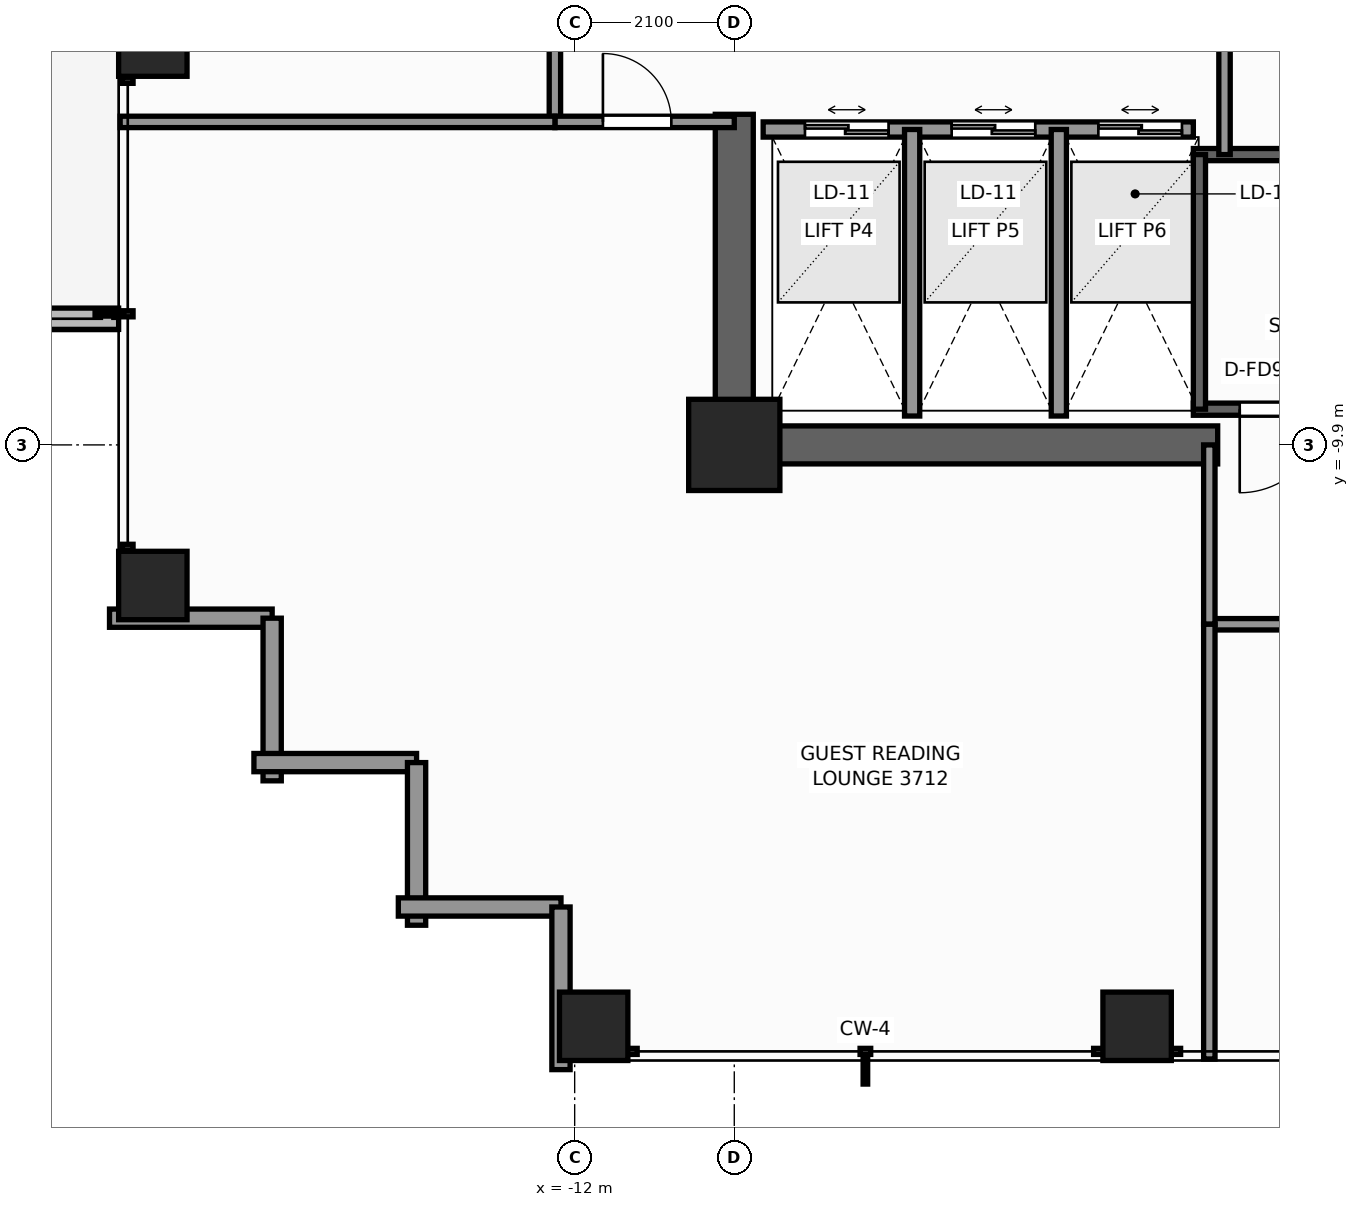
"""IFC4 building model, lengths in metres.
Left out: names, types, materials, properties, quantities, classifications, styles, units other than length and angle.
Written with IfcOpenShell. Run it as: python <this file> out.ifc"""

import sys

from ifc_helpers import new_model, si_unit, direction, frame, frame_2d, origin, origin_2d, place, context, subcontext, project, spatial, rectangle, extrude, element, fill, save


model = new_model("IFC4")
c1 = context("Model", 3, precision=1e-05, world=origin(), true_north=direction((0.0, 1.0)))
c2 = subcontext(c1, "Body", "Model", "MODEL_VIEW")
j1 = project(units=[si_unit("LENGTHUNIT", "METRE"), si_unit("PLANEANGLEUNIT", "RADIAN")], contexts=[c1])
p1 = place(None, origin())
s1 = spatial("IfcSite", under=j1, at=p1, CompositionType="ELEMENT")
p2 = place(p1, origin())
s2 = spatial("IfcBuilding", under=s1, at=p2, CompositionType="ELEMENT")
p3 = place(p2, frame((0.0, 0.0, 128.3)))
s3 = spatial("IfcBuildingStorey", under=s2, at=p3, CompositionType="ELEMENT", Elevation=128.3)
p4 = place(p3, frame((-3.54, -9.9, 0.0), z_axis=(0.0, 0.0, 1.0), x_axis=(-1.0, 0.0, 0.0)))
e1 = element("IfcWall", 1, at=p4, inside=s3, PredefinedType="SHEAR", context=c2, shape_type="SweptSolid", body=[
    extrude(rectangle(XDim=6.61, YDim=0.5, at=frame_2d((3.305, 0.0))), origin(), (0.0, 0.0, 1.0), 3.3),
])
p5 = place(p3, frame((-9.9, -9.65, 0.0), z_axis=(0.0, 0.0, 1.0), x_axis=(0.0, 1.0, 0.0)))
e2 = element("IfcWall", 2, at=p5, inside=s3, PredefinedType="SHEAR", context=c2, shape_type="SweptSolid", body=[
    extrude(rectangle(XDim=4.1, YDim=0.5, at=frame_2d((2.05, 0.0))), origin(), (0.0, 0.0, 1.0), 3.3),
])
p6 = place(p3, frame((-9.9, -9.9, 0.0), z_axis=(0.0, 0.0, 1.0), x_axis=(1.0, 0.0, 0.0)))
e3 = element("IfcColumn", 3, at=p6, inside=s3, PredefinedType="COLUMN", context=c2, shape_type="SweptSolid", body=[
    extrude(rectangle(XDim=1.2, YDim=1.2, at=origin_2d()), origin(), (0.0, 0.0, 1.0), 3.3),
])
for number, where, z_axis, x_axis in (
    (4, (-11.75, -17.55, 0.0), (0.0, 0.0, 1.0), (1.0, 0.0, 0.0)),
    (5, (-4.6, -17.55, 0.0), (0.0, 0.0, 1.0), (1.0, 0.0, 0.0)),
    (6, (-17.55, -11.75, 0.0), (0.0, 0.0, 1.0), (1.0, 0.0, 0.0)),
    (7, (-17.55, -4.6, 0.0), (0.0, 0.0, 1.0), (1.0, 0.0, 0.0)),
):
    element("IfcColumn", number, at=place(p3, frame(where, z_axis=z_axis, x_axis=x_axis)), inside=s3, PredefinedType="COLUMN", context=c2, shape_type="SweptSolid", body=[
        extrude(rectangle(XDim=0.9, YDim=0.9, at=origin_2d()), origin(), (0.0, 0.0, 1.0), 3.3),
    ])
p7 = place(p3, frame((-21.214, -8.24, -0.02), z_axis=(0.0, 0.0, 1.0), x_axis=(1.0, 0.0, 0.0)))
e8 = element("IfcWall", 8, at=p7, inside=s3, PredefinedType="PARAPET", context=c2, shape_type="SweptSolid", body=[
    extrude(rectangle(XDim=3.214, YDim=0.28, at=frame_2d((1.607, 0.0))), origin(), (0.0, 0.0, 1.0), 0.42),
])
for number, where, z_axis, x_axis in (
    (9, (-15.98, -12.18, 0.0), (0.0, 0.0, 1.0), (-1.0, 0.0, 0.0)),
    (10, (-15.98, -14.32, 0.0), (0.0, 0.0, 1.0), (0.0, 1.0, 0.0)),
):
    element("IfcWall", number, at=place(p3, frame(where, z_axis=z_axis, x_axis=x_axis)), inside=s3, PredefinedType="STANDARD", context=c2, shape_type="SweptSolid", body=[
        extrude(rectangle(XDim=2.14, YDim=0.24, at=frame_2d((1.07, 0.0))), origin(), (0.0, 0.0, 1.0), 2.479),
    ])
for number, where, z_axis, x_axis in (
    (11, (-14.08, -14.08, 0.0), (0.0, 0.0, 1.0), (-1.0, 0.0, 0.0)),
    (12, (-14.08, -16.22, 0.0), (0.0, 0.0, 1.0), (0.0, 1.0, 0.0)),
):
    element("IfcWall", number, at=place(p3, frame(where, z_axis=z_axis, x_axis=x_axis)), inside=s3, PredefinedType="STANDARD", context=c2, shape_type="SweptSolid", body=[
        extrude(rectangle(XDim=2.14, YDim=0.24, at=frame_2d((1.07, 0.0))), origin(), (0.0, 0.0, 1.0), 2.479),
    ])
for number, where, z_axis, x_axis in (
    (13, (-12.18, -15.98, 0.0), (0.0, 0.0, 1.0), (-1.0, 0.0, 0.0)),
    (14, (-12.18, -18.12, 0.0), (0.0, 0.0, 1.0), (0.0, 1.0, 0.0)),
):
    element("IfcWall", number, at=place(p3, frame(where, z_axis=z_axis, x_axis=x_axis)), inside=s3, PredefinedType="STANDARD", context=c2, shape_type="SweptSolid", body=[
        extrude(rectangle(XDim=2.14, YDim=0.24, at=frame_2d((1.07, 0.0))), origin(), (0.0, 0.0, 1.0), 2.479),
    ])
p8 = place(p3, frame((3.86, -9.43, 0.0), z_axis=(0.0, 0.0, 1.0), x_axis=(-1.0, 0.0, 0.0)))
e15 = element("IfcWall", 15, at=p8, inside=s3, PredefinedType="SHEAR", context=c2, shape_type="SweptSolid", body=[
    extrude(rectangle(XDim=7.72, YDim=0.16, at=frame_2d((3.86, 0.0))), origin(), (0.0, 0.0, 1.0), 3.3),
])
p9 = place(p8, frame((6.01, 0.0, 0.0)))
e16 = element("IfcOpeningElement", 16, at=p9, cuts=e15, PredefinedType="OPENING", context=c2, shape_type="SweptSolid", body=[
    extrude(rectangle(XDim=1.1, YDim=2.2, at=frame_2d((0.55, 1.1))), frame((0.0, 0.09, 0.0), z_axis=(0.0, -1.0, 0.0), x_axis=(1.0, 0.0, 0.0)), (0.0, 0.0, 1.0), 0.18),
])
p10 = place(p3, frame((-3.86, -6.08, 0.0), z_axis=(0.0, 0.0, 1.0), x_axis=(1.0, 0.0, 0.0)))
e17 = element("IfcWall", 17, at=p10, inside=s3, PredefinedType="SHEAR", context=c2, shape_type="SweptSolid", body=[
    extrude(rectangle(XDim=7.72, YDim=0.16, at=frame_2d((3.86, 0.0))), origin(), (0.0, 0.0, 1.0), 3.3),
])
p11 = place(p3, frame((-3.78, -9.43, 0.0), z_axis=(0.0, 0.0, 1.0), x_axis=(0.0, 1.0, 0.0)))
e18 = element("IfcWall", 18, at=p11, inside=s3, PredefinedType="SHEAR", context=c2, shape_type="SweptSolid", body=[
    extrude(rectangle(XDim=3.35, YDim=0.16, at=frame_2d((1.675, 0.0))), origin(), (0.0, 0.0, 1.0), 3.3),
])
p12 = place(p3, frame((-9.52, -5.75, 0.0), z_axis=(0.0, 0.0, 1.0), x_axis=(1.0, 0.0, 0.0)))
e19 = element("IfcWall", 19, at=p12, inside=s3, PredefinedType="SOLIDWALL", context=c2, shape_type="SweptSolid", body=[
    extrude(rectangle(XDim=5.66, YDim=0.2, at=frame_2d((2.83, 0.0))), origin(), (0.0, 0.0, 1.0), 3.1),
])
p13 = place(p12, frame((0.55, 0.0, 0.0)))
e20 = element("IfcOpeningElement", 20, at=p13, cuts=e19, PredefinedType="OPENING", context=c2, shape_type="SweptSolid", body=[
    extrude(rectangle(XDim=1.1, YDim=2.2, at=frame_2d((0.55, 1.1))), frame((0.0, 0.11, 0.0), z_axis=(0.0, -1.0, 0.0), x_axis=(1.0, 0.0, 0.0)), (0.0, 0.0, 1.0), 0.22),
])
p14 = place(p12, frame((2.48, 0.0, 0.0)))
e21 = element("IfcOpeningElement", 21, at=p14, cuts=e19, PredefinedType="OPENING", context=c2, shape_type="SweptSolid", body=[
    extrude(rectangle(XDim=1.1, YDim=2.2, at=frame_2d((0.55, 1.1))), frame((0.0, 0.11, 0.0), z_axis=(0.0, -1.0, 0.0), x_axis=(1.0, 0.0, 0.0)), (0.0, 0.0, 1.0), 0.22),
])
p15 = place(p12, frame((4.41, 0.0, 0.0)))
e22 = element("IfcOpeningElement", 22, at=p15, cuts=e19, PredefinedType="OPENING", context=c2, shape_type="SweptSolid", body=[
    extrude(rectangle(XDim=1.1, YDim=2.2, at=frame_2d((0.55, 1.1))), frame((0.0, 0.11, 0.0), z_axis=(0.0, -1.0, 0.0), x_axis=(1.0, 0.0, 0.0)), (0.0, 0.0, 1.0), 0.22),
])
for number, where, z_axis, x_axis in (
    (23, (-7.56, -9.52, 0.0), (0.0, 0.0, 1.0), (0.0, 1.0, 0.0)),
    (24, (-5.63, -9.52, 0.0), (0.0, 0.0, 1.0), (0.0, 1.0, 0.0)),
):
    element("IfcWall", number, at=place(p3, frame(where, z_axis=z_axis, x_axis=x_axis)), inside=s3, PredefinedType="SOLIDWALL", context=c2, shape_type="SweptSolid", body=[
        extrude(rectangle(XDim=3.77, YDim=0.2, at=frame_2d((1.885, 0.0))), origin(), (0.0, 0.0, 1.0), 3.1),
    ])
p16 = place(p3, frame((-3.45, -6.08, 0.0), z_axis=(0.0, 0.0, 1.0), x_axis=(0.0, 1.0, 0.0)))
e25 = element("IfcWall", 25, at=p16, inside=s3, PredefinedType="PARTITIONING", context=c2, shape_type="SweptSolid", body=[
    extrude(rectangle(XDim=2.36, YDim=0.15, at=frame_2d((1.18, 0.0))), origin(), (0.0, 0.0, 1.0), 3.1),
])
p17 = place(p3, frame((-3.65, -12.26, 0.0), z_axis=(0.0, 0.0, 1.0), x_axis=(1.0, 0.0, 0.0)))
e26 = element("IfcWall", 26, at=p17, inside=s3, PredefinedType="PARTITIONING", context=c2, shape_type="SweptSolid", body=[
    extrude(rectangle(XDim=16.07, YDim=0.15, at=frame_2d((8.035, 0.0))), origin(), (0.0, 0.0, 1.0), 2.312),
])
p18 = place(p17, frame((0.936, 0.0, 0.0)))
e27 = element("IfcOpeningElement", 27, at=p18, cuts=e26, PredefinedType="OPENING", context=c2, shape_type="SweptSolid", body=[
    extrude(rectangle(XDim=0.95, YDim=2.06, at=frame_2d((0.475, 1.03))), frame((0.0, 0.085, 0.0), z_axis=(0.0, -1.0, 0.0), x_axis=(1.0, 0.0, 0.0)), (0.0, 0.0, 1.0), 0.17),
])
p19 = place(p17, frame((9.893, 0.0, 0.0)))
e28 = element("IfcOpeningElement", 28, at=p19, cuts=e26, PredefinedType="OPENING", context=c2, shape_type="SweptSolid", body=[
    extrude(rectangle(XDim=0.95, YDim=2.06, at=frame_2d((0.475, 1.03))), frame((0.0, 0.085, 0.0), z_axis=(0.0, -1.0, 0.0), x_axis=(1.0, 0.0, 0.0)), (0.0, 0.0, 1.0), 0.17),
])
p20 = place(p17, frame((12.253, 0.0, 0.0)))
e29 = element("IfcOpeningElement", 29, at=p20, cuts=e26, PredefinedType="OPENING", context=c2, shape_type="SweptSolid", body=[
    extrude(rectangle(XDim=0.9, YDim=2.06, at=frame_2d((0.45, 1.03))), frame((0.0, 0.085, 0.0), z_axis=(0.0, -1.0, 0.0), x_axis=(1.0, 0.0, 0.0)), (0.0, 0.0, 1.0), 0.17),
])
p21 = place(p3, frame((-3.65, -12.26, 0.0), z_axis=(0.0, 0.0, 1.0), x_axis=(0.0, 1.0, 0.0)))
e30 = element("IfcWall", 30, at=p21, inside=s3, PredefinedType="PARTITIONING", context=c2, shape_type="SweptSolid", body=[
    extrude(rectangle(XDim=2.36, YDim=0.15, at=frame_2d((1.18, 0.0))), origin(), (0.0, 0.0, 1.0), 3.1),
])
p22 = place(p3, frame((-12.26, -5.65, 0.0), z_axis=(0.0, 0.0, 1.0), x_axis=(0.0, 1.0, 0.0)))
e31 = element("IfcWall", 31, at=p22, inside=s3, PredefinedType="PARTITIONING", context=c2, shape_type="SweptSolid", body=[
    extrude(rectangle(XDim=3.6, YDim=0.15, at=frame_2d((1.8, 0.0))), origin(), (0.0, 0.0, 1.0), 2.312),
])
p23 = place(p22, frame((2.156, 0.0, 0.0)))
e32 = element("IfcOpeningElement", 32, at=p23, cuts=e31, PredefinedType="OPENING", context=c2, shape_type="SweptSolid", body=[
    extrude(rectangle(XDim=0.9, YDim=2.06, at=frame_2d((0.45, 1.03))), frame((0.0, 0.085, 0.0), z_axis=(0.0, -1.0, 0.0), x_axis=(1.0, 0.0, 0.0)), (0.0, 0.0, 1.0), 0.17),
])
p24 = place(p3, frame((-12.26, -5.65, 0.0), z_axis=(0.0, 0.0, 1.0), x_axis=(1.0, 0.0, 0.0)))
e33 = element("IfcWall", 33, at=p24, inside=s3, PredefinedType="PARTITIONING", context=c2, shape_type="SweptSolid", body=[
    extrude(rectangle(XDim=2.36, YDim=0.15, at=frame_2d((1.18, 0.0))), origin(), (0.0, 0.0, 1.0), 3.1),
])
p25 = place(p24, frame((0.632, 0.0, 0.0)))
e34 = element("IfcOpeningElement", 34, at=p25, cuts=e33, PredefinedType="OPENING", context=c2, shape_type="SweptSolid", body=[
    extrude(rectangle(XDim=0.9, YDim=2.06, at=frame_2d((0.45, 1.03))), frame((0.0, 0.085, 0.0), z_axis=(0.0, -1.0, 0.0), x_axis=(1.0, 0.0, 0.0)), (0.0, 0.0, 1.0), 0.17),
])
for number, where, z_axis, x_axis in (
    (35, (-17.98, -5.65, 0.0), (0.0, 0.0, 1.0), (1.0, 0.0, 0.0)),
    (36, (-3.65, -17.98, 0.0), (0.0, 0.0, 1.0), (0.0, 1.0, 0.0)),
):
    element("IfcWall", number, at=place(p3, frame(where, z_axis=z_axis, x_axis=x_axis)), inside=s3, PredefinedType="PARTITIONING", context=c2, shape_type="SweptSolid", body=[
        extrude(rectangle(XDim=5.72, YDim=0.15, at=frame_2d((2.86, 0.0))), origin(), (0.0, 0.0, 1.0), 2.469),
    ])
p26 = place(p9, origin())
e37 = element("IfcDoor", 37, at=p26, inside=s3, OperationType="SINGLE_SWING_RIGHT", PredefinedType="DOOR", context=c2, shape_type="SweptSolid", body=[
    extrude(rectangle(XDim=1.1, YDim=2.2, at=frame_2d((0.55, 1.1))), frame((0.0, 0.025, 0.0), z_axis=(0.0, -1.0, 0.0), x_axis=(1.0, 0.0, 0.0)), (0.0, 0.0, 1.0), 0.05),
])
fill(e16, e37)
p27 = place(p13, origin())
e38 = element("IfcDoor", 38, at=p27, inside=s3, OperationType="DOUBLE_DOOR_SLIDING", PredefinedType="DOOR", context=c2, shape_type="SweptSolid", body=[
    extrude(rectangle(XDim=1.1, YDim=2.2, at=frame_2d((0.55, 1.1))), frame((0.0, 0.025, 0.0), z_axis=(0.0, -1.0, 0.0), x_axis=(1.0, 0.0, 0.0)), (0.0, 0.0, 1.0), 0.05),
])
fill(e20, e38)
p28 = place(p14, origin())
e39 = element("IfcDoor", 39, at=p28, inside=s3, OperationType="DOUBLE_DOOR_SLIDING", PredefinedType="DOOR", context=c2, shape_type="SweptSolid", body=[
    extrude(rectangle(XDim=1.1, YDim=2.2, at=frame_2d((0.55, 1.1))), frame((0.0, 0.025, 0.0), z_axis=(0.0, -1.0, 0.0), x_axis=(1.0, 0.0, 0.0)), (0.0, 0.0, 1.0), 0.05),
])
fill(e21, e39)
p29 = place(p15, origin())
e40 = element("IfcDoor", 40, at=p29, inside=s3, OperationType="DOUBLE_DOOR_SLIDING", PredefinedType="DOOR", context=c2, shape_type="SweptSolid", body=[
    extrude(rectangle(XDim=1.1, YDim=2.2, at=frame_2d((0.55, 1.1))), frame((0.0, 0.025, 0.0), z_axis=(0.0, -1.0, 0.0), x_axis=(1.0, 0.0, 0.0)), (0.0, 0.0, 1.0), 0.05),
])
fill(e22, e40)
p30 = place(p25, origin())
e41 = element("IfcDoor", 41, at=p30, inside=s3, OperationType="SINGLE_SWING_LEFT", PredefinedType="DOOR", context=c2, shape_type="SweptSolid", body=[
    extrude(rectangle(XDim=0.9, YDim=2.06, at=frame_2d((0.45, 1.03))), frame((0.0, 0.025, 0.0), z_axis=(0.0, -1.0, 0.0), x_axis=(1.0, 0.0, 0.0)), (0.0, 0.0, 1.0), 0.05),
])
fill(e34, e41)
save(model, sys.argv[1])
